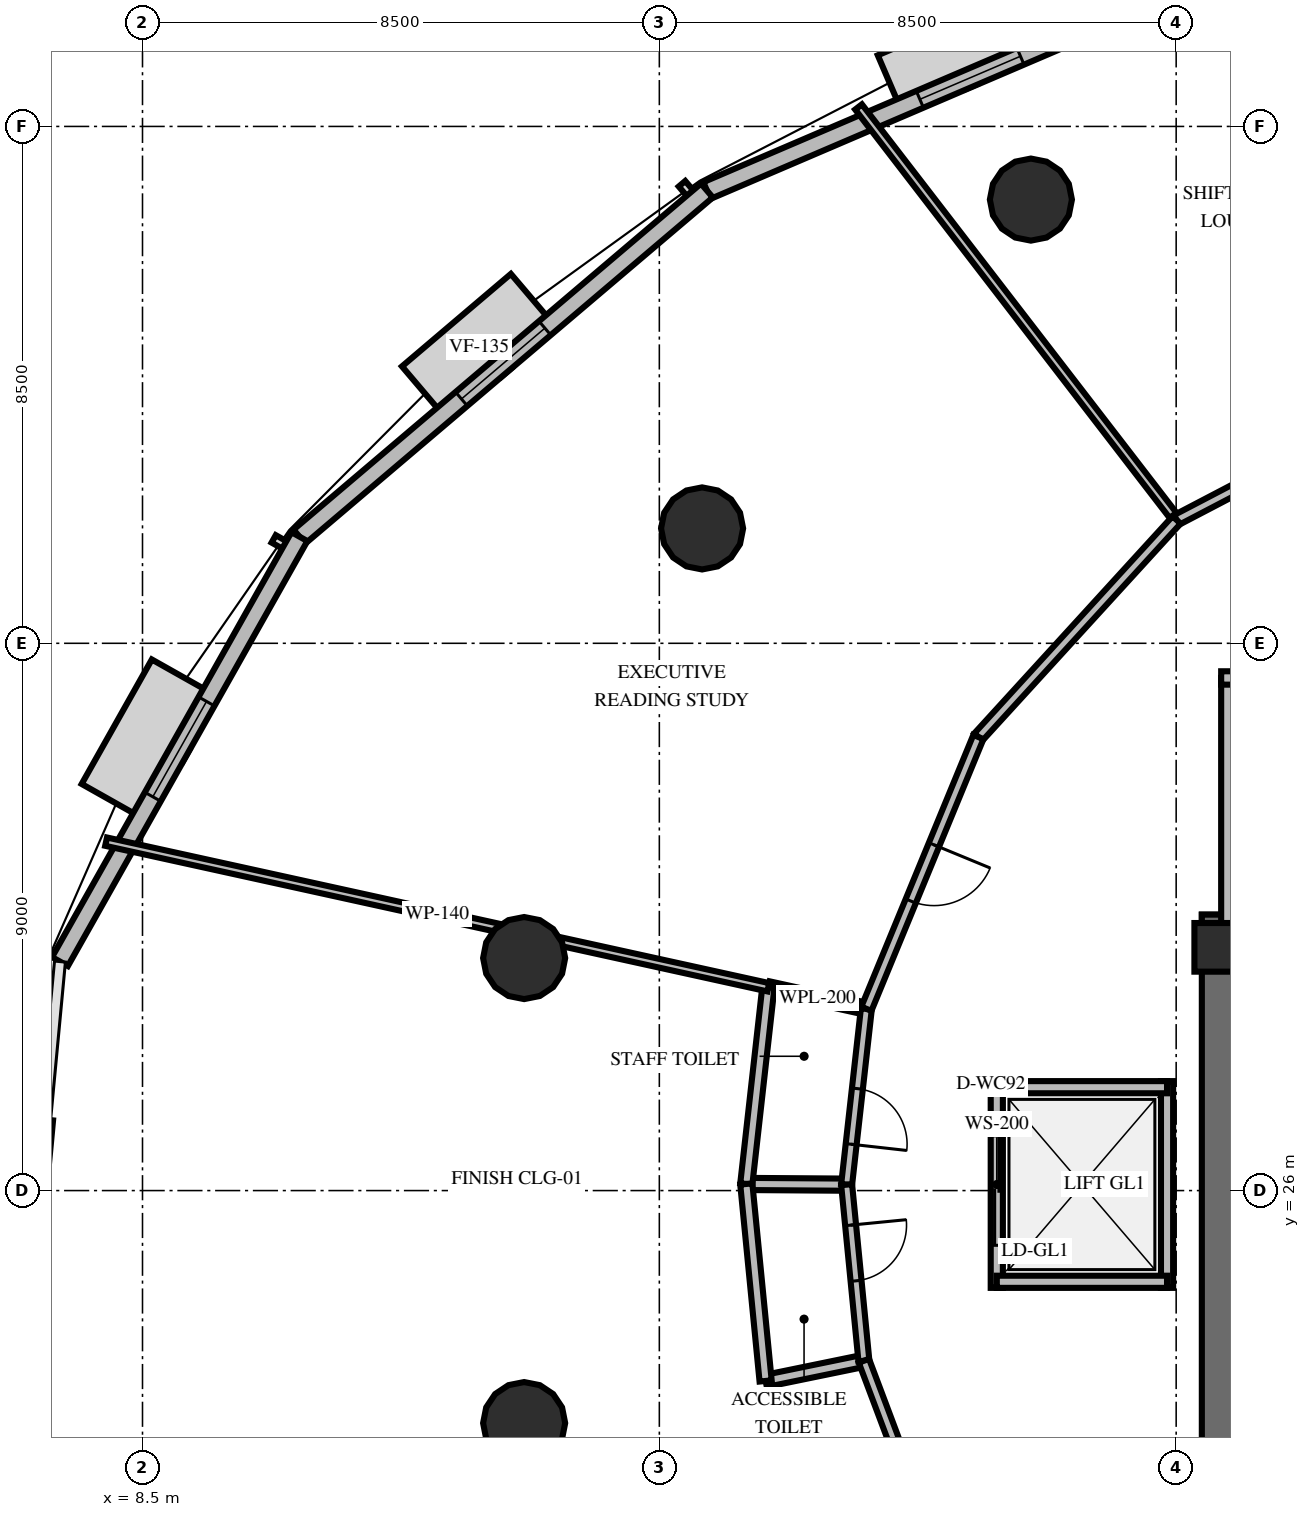
"""IFC4 building model, lengths in metres.
Left out: names, types, materials, properties, quantities, classifications, styles, units other than length and angle.
Written with IfcOpenShell. Run it as: python <this file> out.ifc"""

import sys

from ifc_helpers import new_model, si_unit, direction, frame, frame_2d, origin, origin_2d, place, context, subcontext, project, spatial, rectangle, circle, extrude, element, fill, save


model = new_model("IFC4")
c1 = context("Model", 3, precision=1e-05, world=origin(), true_north=direction((0.0, 1.0)))
c2 = subcontext(c1, "Body", "Model", "MODEL_VIEW")
j1 = project(units=[si_unit("LENGTHUNIT", "METRE"), si_unit("PLANEANGLEUNIT", "RADIAN")], contexts=[c1])
p1 = place(None, origin())
s1 = spatial("IfcSite", under=j1, at=p1, CompositionType="ELEMENT")
p2 = place(p1, origin())
s2 = spatial("IfcBuilding", under=s1, at=p2, CompositionType="ELEMENT")
p3 = place(p2, frame((0.0, 0.0, 63.6)))
s3 = spatial("IfcBuildingStorey", under=s2, at=p3, CompositionType="ELEMENT", Elevation=63.6)
p4 = place(p3, frame((25.922, 30.088, 0.0), z_axis=(0.0, 0.0, 1.0), x_axis=(1.0, 0.0, 0.0)))
e1 = element("IfcWall", 1, at=p4, inside=s3, PredefinedType="SHEAR", context=c2, shape_type="SweptSolid", body=[
    extrude(rectangle(XDim=16.166, YDim=0.9, at=frame_2d((8.083, 0.0))), origin(), (0.0, 0.0, 1.0), 4.2),
])
p5 = place(p4, frame((1.028, 0.0, 0.0)))
e2 = element("IfcOpeningElement", 2, at=p5, cuts=e1, PredefinedType="OPENING", context=c2, shape_type="SweptSolid", body=[
    extrude(rectangle(XDim=1.05, YDim=2.15, at=frame_2d((0.525, 1.075))), frame((0.0, 0.46, 0.0), z_axis=(0.0, -1.0, 0.0), x_axis=(1.0, 0.0, 0.0)), (0.0, 0.0, 1.0), 0.92),
])
p6 = place(p4, frame((14.078, 0.0, 0.0)))
e3 = element("IfcOpeningElement", 3, at=p6, cuts=e1, PredefinedType="OPENING", context=c2, shape_type="SweptSolid", body=[
    extrude(rectangle(XDim=1.05, YDim=2.15, at=frame_2d((0.525, 1.075))), frame((0.0, 0.46, 0.0), z_axis=(0.0, -1.0, 0.0), x_axis=(1.0, 0.0, 0.0)), (0.0, 0.0, 1.0), 0.92),
])
p7 = place(p4, frame((7.528, 0.0, 0.0)))
e4 = element("IfcOpeningElement", 4, at=p7, cuts=e1, PredefinedType="OPENING", context=c2, shape_type="SweptSolid", body=[
    extrude(rectangle(XDim=1.1, YDim=2.15, at=frame_2d((0.55, 1.075))), frame((0.0, 0.46, 0.0), z_axis=(0.0, -1.0, 0.0), x_axis=(1.0, 0.0, 0.0)), (0.0, 0.0, 1.0), 0.92),
])
p8 = place(p3, frame((26.372, 19.662, 0.0), z_axis=(0.0, 0.0, 1.0), x_axis=(0.0, 1.0, 0.0)))
e5 = element("IfcWall", 5, at=p8, inside=s3, PredefinedType="SHEAR", context=c2, shape_type="SweptSolid", body=[
    extrude(rectangle(XDim=10.876, YDim=0.9, at=frame_2d((5.438, 0.0))), origin(), (0.0, 0.0, 1.0), 4.2),
])
p9 = place(p3, frame((26.2, 30.0, 0.0), z_axis=(0.0, 0.0, 1.0), x_axis=(1.0, 0.0, 0.0)))
e6 = element("IfcColumn", 6, at=p9, inside=s3, PredefinedType="PILASTER", context=c2, shape_type="SweptSolid", body=[
    extrude(rectangle(XDim=0.8, YDim=0.8, at=origin_2d()), origin(), (0.0, 0.0, 1.0), 4.2),
])
for number, where, z_axis, x_axis in (
    (7, (23.111, 42.297, 0.0), (0.0, 0.0, 1.0), (1.0, 0.0, 0.0)),
    (8, (17.703, 36.889, 0.0), (0.0, 0.0, 1.0), (1.0, 0.0, 0.0)),
    (9, (14.777, 29.824, 0.0), (0.0, 0.0, 1.0), (1.0, 0.0, 0.0)),
    (10, (14.777, 22.176, 0.0), (0.0, 0.0, 1.0), (1.0, 0.0, 0.0)),
):
    element("IfcColumn", number, at=place(p3, frame(where, z_axis=z_axis, x_axis=x_axis)), inside=s3, PredefinedType="COLUMN", context=c2, shape_type="SweptSolid", body=[
        extrude(circle(Radius=0.675, at=origin_2d()), origin(), (0.0, 0.0, 1.0), 4.2),
    ])
p10 = place(p3, frame((26.441, 46.154, 0.0), z_axis=(0.0, 0.0, 1.0), x_axis=(-0.919246893901, -0.393681531259, 0.0)))
e11 = element("IfcWall", 11, at=p10, inside=s3, PredefinedType="SOLIDWALL", context=c2, shape_type="SweptSolid", body=[
    extrude(rectangle(XDim=9.419, YDim=0.3, at=frame_2d((4.709, 0.0))), origin(), (0.0, 0.0, 1.0), 3.0),
])
p11 = place(p10, frame((3.809, 0.0, 0.8)))
e12 = element("IfcOpeningElement", 12, at=p11, cuts=e11, PredefinedType="OPENING", context=c2, shape_type="SweptSolid", body=[
    extrude(rectangle(XDim=1.8, YDim=1.95, at=frame_2d((0.9, 0.975))), frame((0.0, 0.16, 0.0), z_axis=(0.0, -1.0, 0.0), x_axis=(1.0, 0.0, 0.0)), (0.0, 0.0, 1.0), 0.32),
])
p12 = place(p3, frame((17.782, 42.446, 0.0), z_axis=(0.0, 0.0, 1.0), x_axis=(-0.76225711474, -0.6472743553, 0.0)))
e13 = element("IfcWall", 13, at=p12, inside=s3, PredefinedType="SOLIDWALL", context=c2, shape_type="SweptSolid", body=[
    extrude(rectangle(XDim=8.792, YDim=0.3, at=frame_2d((4.396, 0.0))), origin(), (0.0, 0.0, 1.0), 3.0),
])
p13 = place(p12, frame((3.496, 0.0, 0.8)))
e14 = element("IfcOpeningElement", 14, at=p13, cuts=e13, PredefinedType="OPENING", context=c2, shape_type="SweptSolid", body=[
    extrude(rectangle(XDim=1.8, YDim=1.95, at=frame_2d((0.9, 0.975))), frame((0.0, 0.16, 0.0), z_axis=(0.0, -1.0, 0.0), x_axis=(1.0, 0.0, 0.0)), (0.0, 0.0, 1.0), 0.32),
])
p14 = place(p3, frame((11.08, 36.755, 0.0), z_axis=(0.0, 0.0, 1.0), x_axis=(-0.490895470353, -0.871218478446, 0.0)))
e15 = element("IfcWall", 15, at=p14, inside=s3, PredefinedType="SOLIDWALL", context=c2, shape_type="SweptSolid", body=[
    extrude(rectangle(XDim=8.021, YDim=0.3, at=frame_2d((4.011, 0.0))), origin(), (0.0, 0.0, 1.0), 3.0),
])
p15 = place(p14, frame((3.111, 0.0, 0.8)))
e16 = element("IfcOpeningElement", 16, at=p15, cuts=e15, PredefinedType="OPENING", context=c2, shape_type="SweptSolid", body=[
    extrude(rectangle(XDim=1.8, YDim=1.95, at=frame_2d((0.9, 0.975))), frame((0.0, 0.16, 0.0), z_axis=(0.0, -1.0, 0.0), x_axis=(1.0, 0.0, 0.0)), (0.0, 0.0, 1.0), 0.32),
])
p16 = place(p3, frame((26.35, 30.05, 0.0), z_axis=(0.0, 0.0, 1.0), x_axis=(0.0, 1.0, 0.0)))
e17 = element("IfcWall", 17, at=p16, inside=s3, PredefinedType="SOLIDWALL", context=c2, shape_type="SweptSolid", body=[
    extrude(rectangle(XDim=4.38, YDim=0.22, at=frame_2d((2.19, 0.0))), origin(), (0.0, 0.0, 1.0), 3.0),
])
p17 = place(p3, frame((26.24, 34.43, 0.0), z_axis=(0.0, 0.0, 1.0), x_axis=(1.0, 0.0, 0.0)))
e18 = element("IfcWall", 18, at=p17, inside=s3, PredefinedType="SOLIDWALL", context=c2, shape_type="SweptSolid", body=[
    extrude(rectangle(XDim=4.31, YDim=0.22, at=frame_2d((2.155, 0.0))), origin(), (0.0, 0.0, 1.0), 3.0),
])
p18 = place(p17, frame((1.6, 0.0, 0.0)))
e19 = element("IfcOpeningElement", 19, at=p18, cuts=e18, PredefinedType="OPENING", context=c2, shape_type="SweptSolid", body=[
    extrude(rectangle(XDim=1.1, YDim=2.15, at=frame_2d((0.55, 1.075))), frame((0.0, 0.12, 0.0), z_axis=(0.0, -1.0, 0.0), x_axis=(1.0, 0.0, 0.0)), (0.0, 0.0, 1.0), 0.24),
])
p19 = place(p3, frame((22.55, 24.4, 0.0), z_axis=(0.0, 0.0, 1.0), x_axis=(0.0, 1.0, 0.0)))
e20 = element("IfcWall", 20, at=p19, inside=s3, PredefinedType="SOLIDWALL", context=c2, shape_type="SweptSolid", body=[
    extrude(rectangle(XDim=3.4, YDim=0.2, at=frame_2d((1.7, 0.0))), origin(), (0.0, 0.0, 1.0), 3.0),
])
p20 = place(p19, frame((0.7, 0.0, 0.0)))
e21 = element("IfcOpeningElement", 21, at=p20, cuts=e20, PredefinedType="OPENING", context=c2, shape_type="SweptSolid", body=[
    extrude(rectangle(XDim=1.8, YDim=2.4, at=frame_2d((0.9, 1.2))), frame((0.0, 0.11, 0.0), z_axis=(0.0, -1.0, 0.0), x_axis=(1.0, 0.0, 0.0)), (0.0, 0.0, 1.0), 0.22),
])
p21 = place(p3, frame((25.35, 24.4, 0.0), z_axis=(0.0, 0.0, 1.0), x_axis=(0.0, 1.0, 0.0)))
e22 = element("IfcWall", 22, at=p21, inside=s3, PredefinedType="SOLIDWALL", context=c2, shape_type="SweptSolid", body=[
    extrude(rectangle(XDim=3.4, YDim=0.2, at=frame_2d((1.7, 0.0))), origin(), (0.0, 0.0, 1.0), 3.0),
])
for number, where, z_axis, x_axis in (
    (23, (22.55, 24.5, 0.0), (0.0, 0.0, 1.0), (1.0, 0.0, 0.0)),
    (24, (22.55, 27.7, 0.0), (0.0, 0.0, 1.0), (1.0, 0.0, 0.0)),
):
    element("IfcWall", number, at=place(p3, frame(where, z_axis=z_axis, x_axis=x_axis)), inside=s3, PredefinedType="SOLIDWALL", context=c2, shape_type="SweptSolid", body=[
        extrude(rectangle(XDim=2.8, YDim=0.2, at=frame_2d((1.4, 0.0))), origin(), (0.0, 0.0, 1.0), 3.0),
    ])
p22 = place(p3, frame((20.405, 28.989, 0.0), z_axis=(0.0, 0.0, 1.0), x_axis=(-0.976651296643, 0.21483073515, 0.0)))
e25 = element("IfcWall", 25, at=p22, inside=s3, PredefinedType="PLUMBINGWALL", context=c2, shape_type="SweptSolid", body=[
    extrude(rectangle(XDim=1.65, YDim=0.2, at=frame_2d((0.825, 0.0))), origin(), (0.0, 0.0, 1.0), 3.0),
])
p23 = place(p3, frame((20.08, 26.097, 0.0), z_axis=(0.0, 0.0, 1.0), x_axis=(-0.99997581681, 0.006954552144, 0.0)))
e26 = element("IfcWall", 26, at=p23, inside=s3, PredefinedType="PLUMBINGWALL", context=c2, shape_type="SweptSolid", body=[
    extrude(rectangle(XDim=1.65, YDim=0.2, at=frame_2d((0.825, 0.0))), origin(), (0.0, 0.0, 1.0), 3.0),
])
p24 = place(p3, frame((18.793, 29.344, 0.0), z_axis=(0.0, 0.0, 1.0), x_axis=(-0.111452219872, -0.993769793607, 0.0)))
e27 = element("IfcWall", 27, at=p24, inside=s3, PredefinedType="PLUMBINGWALL", context=c2, shape_type="SweptSolid", body=[
    extrude(rectangle(XDim=3.255, YDim=0.2, at=frame_2d((1.627, 0.0))), origin(), (0.0, 0.0, 1.0), 3.0),
])
p25 = place(p3, frame((20.405, 28.989, 0.0), z_axis=(0.0, 0.0, 1.0), x_axis=(-0.111499619196, -0.993764476583, 0.0)))
e28 = element("IfcWall", 28, at=p25, inside=s3, PredefinedType="PARTITIONING", context=c2, shape_type="SweptSolid", body=[
    extrude(rectangle(XDim=2.91, YDim=0.18, at=frame_2d((1.455, 0.0))), origin(), (0.0, 0.0, 1.0), 3.0),
])
p26 = place(p25, frame((1.321, 0.0, 0.0)))
e29 = element("IfcOpeningElement", 29, at=p26, cuts=e28, PredefinedType="OPENING", context=c2, shape_type="SweptSolid", body=[
    extrude(rectangle(XDim=0.92, YDim=2.1, at=frame_2d((0.46, 1.05))), frame((0.0, 0.1, 0.0), z_axis=(0.0, -1.0, 0.0), x_axis=(1.0, 0.0, 0.0)), (0.0, 0.0, 1.0), 0.2),
])
p27 = place(p3, frame((20.364, 23.201, 0.0), z_axis=(0.0, 0.0, 1.0), x_axis=(-0.979572068013, -0.201093420004, 0.0)))
e30 = element("IfcWall", 30, at=p27, inside=s3, PredefinedType="PLUMBINGWALL", context=c2, shape_type="SweptSolid", body=[
    extrude(rectangle(XDim=1.65, YDim=0.2, at=frame_2d((0.825, 0.0))), origin(), (0.0, 0.0, 1.0), 3.0),
])
p28 = place(p3, frame((18.43, 26.109, 0.0), z_axis=(0.0, 0.0, 1.0), x_axis=(0.097580164018, -0.99522766822, 0.0)))
e31 = element("IfcWall", 31, at=p28, inside=s3, PredefinedType="PLUMBINGWALL", context=c2, shape_type="SweptSolid", body=[
    extrude(rectangle(XDim=3.255, YDim=0.2, at=frame_2d((1.627, 0.0))), origin(), (0.0, 0.0, 1.0), 3.0),
])
p29 = place(p3, frame((20.08, 26.097, 0.0), z_axis=(0.0, 0.0, 1.0), x_axis=(0.09756816541, -0.995228844587, 0.0)))
e32 = element("IfcWall", 32, at=p29, inside=s3, PredefinedType="PARTITIONING", context=c2, shape_type="SweptSolid", body=[
    extrude(rectangle(XDim=2.91, YDim=0.18, at=frame_2d((1.455, 0.0))), origin(), (0.0, 0.0, 1.0), 3.0),
])
p30 = place(p29, frame((0.669, 0.0, 0.0)))
e33 = element("IfcOpeningElement", 33, at=p30, cuts=e32, PredefinedType="OPENING", context=c2, shape_type="SweptSolid", body=[
    extrude(rectangle(XDim=0.92, YDim=2.1, at=frame_2d((0.46, 1.05))), frame((0.0, 0.1, 0.0), z_axis=(0.0, -1.0, 0.0), x_axis=(1.0, 0.0, 0.0)), (0.0, 0.0, 1.0), 0.2),
])
p31 = place(p3, frame((18.793, 29.344, 0.0), z_axis=(0.0, 0.0, 1.0), x_axis=(-0.976672388843, 0.214734824543, 0.0)))
e34 = element("IfcWall", 34, at=p31, inside=s3, PredefinedType="PARTITIONING", context=c2, shape_type="SweptSolid", body=[
    extrude(rectangle(XDim=11.152, YDim=0.14, at=frame_2d((5.576, 0.0))), origin(), (0.0, 0.0, 1.0), 3.0),
])
p32 = place(p3, frame((20.364, 23.201, 0.0), z_axis=(0.0, 0.0, 1.0), x_axis=(0.351823691742, -0.936066285008, 0.0)))
e35 = element("IfcWall", 35, at=p32, inside=s3, PredefinedType="PARTITIONING", context=c2, shape_type="SweptSolid", body=[
    extrude(rectangle(XDim=4.355, YDim=0.18, at=frame_2d((2.177, 0.0))), origin(), (0.0, 0.0, 1.0), 3.0),
])
p33 = place(p32, frame((2.441, 0.0, 0.0)))
e36 = element("IfcOpeningElement", 36, at=p33, cuts=e35, PredefinedType="OPENING", context=c2, shape_type="SweptSolid", body=[
    extrude(rectangle(XDim=1.0, YDim=2.15, at=frame_2d((0.5, 1.075))), frame((0.0, 0.1, 0.0), z_axis=(0.0, -1.0, 0.0), x_axis=(1.0, 0.0, 0.0)), (0.0, 0.0, 1.0), 0.2),
])
p34 = place(p3, frame((25.507, 37.029, 0.0), z_axis=(0.0, 0.0, 1.0), x_axis=(-0.610157960661, 0.792279788359, 0.0)))
e37 = element("IfcWall", 37, at=p34, inside=s3, PredefinedType="PARTITIONING", context=c2, shape_type="SweptSolid", body=[
    extrude(rectangle(XDim=8.573, YDim=0.14, at=frame_2d((4.286, 0.0))), origin(), (0.0, 0.0, 1.0), 3.0),
])
p35 = place(p3, frame((29.791, 39.268, 0.0), z_axis=(0.0, 0.0, 1.0), x_axis=(-0.886221674156, -0.463261421075, 0.0)))
e38 = element("IfcWall", 38, at=p35, inside=s3, PredefinedType="PARTITIONING", context=c2, shape_type="SweptSolid", body=[
    extrude(rectangle(XDim=4.834, YDim=0.18, at=frame_2d((2.417, 0.0))), origin(), (0.0, 0.0, 1.0), 3.0),
])
p36 = place(p35, frame((1.034, 0.0, 0.0)))
e39 = element("IfcOpeningElement", 39, at=p36, cuts=e38, PredefinedType="OPENING", context=c2, shape_type="SweptSolid", body=[
    extrude(rectangle(XDim=1.0, YDim=2.15, at=frame_2d((0.5, 1.075))), frame((0.0, 0.1, 0.0), z_axis=(0.0, -1.0, 0.0), x_axis=(1.0, 0.0, 0.0)), (0.0, 0.0, 1.0), 0.2),
])
p37 = place(p3, frame((25.507, 37.029, 0.0), z_axis=(0.0, 0.0, 1.0), x_axis=(-0.674284930573, -0.738471280689, 0.0)))
e40 = element("IfcWall", 40, at=p37, inside=s3, PredefinedType="PARTITIONING", context=c2, shape_type="SweptSolid", body=[
    extrude(rectangle(XDim=4.834, YDim=0.18, at=frame_2d((2.417, 0.0))), origin(), (0.0, 0.0, 1.0), 3.0),
])
p38 = place(p3, frame((22.247, 33.459, 0.0), z_axis=(0.0, 0.0, 1.0), x_axis=(-0.381069812318, -0.92454626609, 0.0)))
e41 = element("IfcWall", 41, at=p38, inside=s3, PredefinedType="PARTITIONING", context=c2, shape_type="SweptSolid", body=[
    extrude(rectangle(XDim=4.834, YDim=0.18, at=frame_2d((2.417, 0.0))), origin(), (0.0, 0.0, 1.0), 3.0),
])
p39 = place(p38, frame((1.917, 0.0, 0.0)))
e42 = element("IfcOpeningElement", 42, at=p39, cuts=e41, PredefinedType="OPENING", context=c2, shape_type="SweptSolid", body=[
    extrude(rectangle(XDim=1.0, YDim=2.15, at=frame_2d((0.5, 1.075))), frame((0.0, 0.1, 0.0), z_axis=(0.0, -1.0, 0.0), x_axis=(1.0, 0.0, 0.0)), (0.0, 0.0, 1.0), 0.2),
])
p40 = place(p11, origin())
e43 = element("IfcWindow", 43, at=p40, inside=s3, PartitioningType="SINGLE_PANEL", PredefinedType="WINDOW", context=c2, shape_type="SweptSolid", body=[
    extrude(rectangle(XDim=1.8, YDim=1.95, at=frame_2d((0.9, 0.975))), frame((0.0, 0.03, 0.0), z_axis=(0.0, -1.0, 0.0), x_axis=(1.0, 0.0, 0.0)), (0.0, 0.0, 1.0), 0.06),
])
fill(e12, e43)
p41 = place(p13, origin())
e44 = element("IfcWindow", 44, at=p41, inside=s3, PartitioningType="SINGLE_PANEL", PredefinedType="WINDOW", context=c2, shape_type="SweptSolid", body=[
    extrude(rectangle(XDim=1.8, YDim=1.95, at=frame_2d((0.9, 0.975))), frame((0.0, 0.03, 0.0), z_axis=(0.0, -1.0, 0.0), x_axis=(1.0, 0.0, 0.0)), (0.0, 0.0, 1.0), 0.06),
])
fill(e14, e44)
p42 = place(p15, origin())
e45 = element("IfcWindow", 45, at=p42, inside=s3, PartitioningType="SINGLE_PANEL", PredefinedType="WINDOW", context=c2, shape_type="SweptSolid", body=[
    extrude(rectangle(XDim=1.8, YDim=1.95, at=frame_2d((0.9, 0.975))), frame((0.0, 0.03, 0.0), z_axis=(0.0, -1.0, 0.0), x_axis=(1.0, 0.0, 0.0)), (0.0, 0.0, 1.0), 0.06),
])
fill(e16, e45)
p43 = place(p20, origin())
e46 = element("IfcDoor", 46, at=p43, inside=s3, OperationType="DOUBLE_DOOR_SLIDING", PredefinedType="USERDEFINED", context=c2, shape_type="SweptSolid", body=[
    extrude(rectangle(XDim=1.8, YDim=2.4, at=frame_2d((0.9, 1.2))), frame((0.0, 0.025, 0.0), z_axis=(0.0, -1.0, 0.0), x_axis=(1.0, 0.0, 0.0)), (0.0, 0.0, 1.0), 0.05),
])
fill(e21, e46)
p44 = place(p26, origin())
e47 = element("IfcDoor", 47, at=p44, inside=s3, OperationType="SINGLE_SWING_RIGHT", PredefinedType="DOOR", context=c2, shape_type="SweptSolid", body=[
    extrude(rectangle(XDim=0.92, YDim=2.1, at=frame_2d((0.46, 1.05))), frame((0.0, 0.025, 0.0), z_axis=(0.0, -1.0, 0.0), x_axis=(1.0, 0.0, 0.0)), (0.0, 0.0, 1.0), 0.05),
])
fill(e29, e47)
p45 = place(p30, origin())
e48 = element("IfcDoor", 48, at=p45, inside=s3, OperationType="SINGLE_SWING_LEFT", PredefinedType="DOOR", context=c2, shape_type="SweptSolid", body=[
    extrude(rectangle(XDim=0.92, YDim=2.1, at=frame_2d((0.46, 1.05))), frame((0.0, 0.025, 0.0), z_axis=(0.0, -1.0, 0.0), x_axis=(1.0, 0.0, 0.0)), (0.0, 0.0, 1.0), 0.05),
])
fill(e33, e48)
p46 = place(p39, origin())
e49 = element("IfcDoor", 49, at=p46, inside=s3, OperationType="SINGLE_SWING_LEFT", PredefinedType="DOOR", context=c2, shape_type="SweptSolid", body=[
    extrude(rectangle(XDim=1.0, YDim=2.15, at=frame_2d((0.5, 1.075))), frame((0.0, 0.025, 0.0), z_axis=(0.0, -1.0, 0.0), x_axis=(1.0, 0.0, 0.0)), (0.0, 0.0, 1.0), 0.05),
])
fill(e42, e49)
save(model, sys.argv[1])
